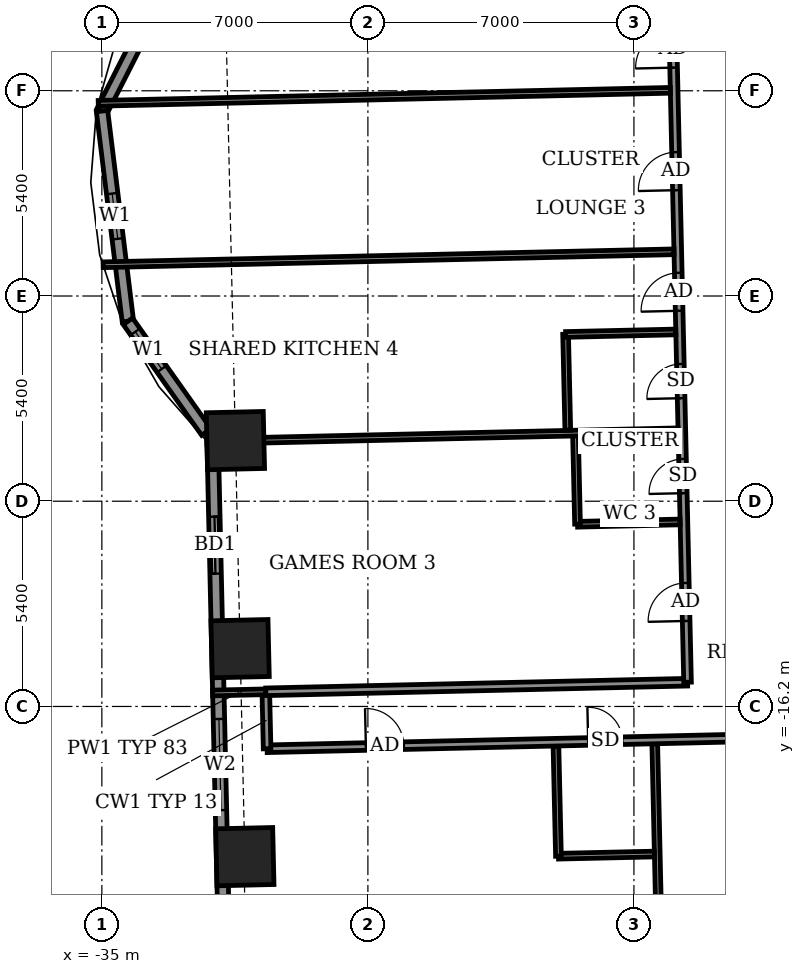
"""IFC4 building model, lengths in metres.
Left out: names, types, materials, properties, quantities, classifications, styles, units other than length and angle.
Written with IfcOpenShell. Run it as: python <this file> out.ifc"""

import sys

from ifc_helpers import new_model, si_unit, direction, frame, frame_2d, origin, origin_2d, place, context, subcontext, project, spatial, rectangle, extrude, element, fill, save


model = new_model("IFC4")
c1 = context("Model", 3, precision=1e-05, world=origin(), true_north=direction((0.0, 1.0)))
c2 = subcontext(c1, "Body", "Model", "MODEL_VIEW")
j1 = project(units=[si_unit("LENGTHUNIT", "METRE"), si_unit("PLANEANGLEUNIT", "RADIAN")], contexts=[c1])
p1 = place(None, origin())
s1 = spatial("IfcSite", under=j1, at=p1, CompositionType="ELEMENT")
p2 = place(p1, origin())
s2 = spatial("IfcBuilding", under=s1, at=p2, CompositionType="ELEMENT")
p3 = place(p2, frame((0.0, 0.0, 44.9)))
s3 = spatial("IfcBuildingStorey", under=s2, at=p3, CompositionType="ELEMENT", Elevation=44.9)
for number, where, z_axis, x_axis in (
    (1, (-31.486, -9.205, -0.55), (0.0, 0.0, 1.0), (0.023, -1.0, 0.0)),
    (2, (-31.362, -14.679, -0.55), (0.0, 0.0, 1.0), (0.023, -1.0, 0.0)),
    (3, (-31.238, -20.152, -0.55), (0.0, 0.0, 1.0), (0.023, -1.0, 0.0)),
):
    element("IfcColumn", number, at=place(p3, frame(where, z_axis=z_axis, x_axis=x_axis)), inside=s3, PredefinedType="COLUMN", context=c2, shape_type="SweptSolid", body=[
        extrude(rectangle(XDim=1.5, YDim=1.5, at=origin_2d()), origin(), (0.0, 0.0, 1.0), 3.6),
    ])
p4 = place(p3, frame((-32.552, 4.28, 0.0), z_axis=(0.0, 0.0, 1.0), x_axis=(-0.452703975507, -0.891660871946, 0.0)))
e4 = element("IfcWall", 4, at=p4, inside=s3, PredefinedType="SOLIDWALL", context=c2, shape_type="SweptSolid", body=[
    extrude(rectangle(XDim=5.399, YDim=0.3, at=frame_2d((2.699, 0.0))), origin(), (0.0, 0.0, 1.0), 3.05),
])
p5 = place(p4, frame((2.007, 0.0, 0.9)))
e5 = element("IfcOpeningElement", 5, at=p5, cuts=e4, PredefinedType="OPENING", context=c2, shape_type="SweptSolid", body=[
    extrude(rectangle(XDim=1.2, YDim=1.5, at=frame_2d((0.6, 0.75))), frame((0.0, 0.16, 0.0), z_axis=(0.0, -1.0, 0.0), x_axis=(1.0, 0.0, 0.0)), (0.0, 0.0, 1.0), 0.32),
])
p6 = place(p3, frame((-34.996, -0.534, 0.0), z_axis=(0.0, 0.0, 1.0), x_axis=(0.122206978992, -0.992504636909, 0.0)))
e6 = element("IfcWall", 6, at=p6, inside=s3, PredefinedType="SOLIDWALL", context=c2, shape_type="SweptSolid", body=[
    extrude(rectangle(XDim=5.574, YDim=0.3, at=frame_2d((2.787, 0.0))), origin(), (0.0, 0.0, 1.0), 3.05),
])
p7 = place(p6, frame((2.187, 0.0, 0.9)))
e7 = element("IfcOpeningElement", 7, at=p7, cuts=e6, PredefinedType="OPENING", context=c2, shape_type="SweptSolid", body=[
    extrude(rectangle(XDim=1.2, YDim=1.5, at=frame_2d((0.6, 0.75))), frame((0.0, 0.16, 0.0), z_axis=(0.0, -1.0, 0.0), x_axis=(1.0, 0.0, 0.0)), (0.0, 0.0, 1.0), 0.32),
])
p8 = place(p3, frame((-34.315, -6.066, 0.0), z_axis=(0.0, 0.0, 1.0), x_axis=(0.578062893695, -0.815992212544, 0.0)))
e8 = element("IfcWall", 8, at=p8, inside=s3, PredefinedType="SOLIDWALL", context=c2, shape_type="SweptSolid", body=[
    extrude(rectangle(XDim=3.569, YDim=0.3, at=frame_2d((1.784, 0.0))), origin(), (0.0, 0.0, 1.0), 3.05),
])
p9 = place(p8, frame((0.338, 0.0, 0.9)))
e9 = element("IfcOpeningElement", 9, at=p9, cuts=e8, PredefinedType="OPENING", context=c2, shape_type="SweptSolid", body=[
    extrude(rectangle(XDim=1.2, YDim=1.5, at=frame_2d((0.6, 0.75))), frame((0.0, 0.16, 0.0), z_axis=(0.0, -1.0, 0.0), x_axis=(1.0, 0.0, 0.0)), (0.0, 0.0, 1.0), 0.32),
])
p10 = place(p3, frame((-32.087, -9.164, 0.0), z_axis=(0.0, 0.0, 1.0), x_axis=(0.022651102902, -0.999743430855, 0.0)))
e10 = element("IfcWall", 10, at=p10, inside=s3, PredefinedType="SOLIDWALL", context=c2, shape_type="SweptSolid", body=[
    extrude(rectangle(XDim=16.329, YDim=0.3, at=frame_2d((8.165, 0.0))), origin(), (0.0, 0.0, 1.0), 3.05),
])
p11 = place(p10, frame((2.042, 0.0, 0.0)))
e11 = element("IfcOpeningElement", 11, at=p11, cuts=e10, PredefinedType="OPENING", context=c2, shape_type="SweptSolid", body=[
    extrude(rectangle(XDim=1.5, YDim=2.4, at=frame_2d((0.75, 1.2))), frame((0.0, 0.16, 0.0), z_axis=(0.0, -1.0, 0.0), x_axis=(1.0, 0.0, 0.0)), (0.0, 0.0, 1.0), 0.32),
])
p12 = place(p10, frame((7.367, 0.0, 0.9)))
e12 = element("IfcOpeningElement", 12, at=p12, cuts=e10, PredefinedType="OPENING", context=c2, shape_type="SweptSolid", body=[
    extrude(rectangle(XDim=2.4, YDim=1.5, at=frame_2d((1.2, 0.75))), frame((0.0, 0.16, 0.0), z_axis=(0.0, -1.0, 0.0), x_axis=(1.0, 0.0, 0.0)), (0.0, 0.0, 1.0), 0.32),
])
p13 = place(p3, frame((-33.464, -12.375, 0.0), z_axis=(0.0, 0.0, 1.0), x_axis=(-0.022929749512, 0.99973707873, 0.0)))
e13 = element("IfcWall", 13, at=p13, inside=s3, PredefinedType="USERDEFINED", context=c2, shape_type="SweptSolid", body=[
    extrude(rectangle(XDim=2.875, YDim=0.55, at=frame_2d((1.438, 0.0))), origin(), (0.0, 0.0, 1.0), 0.8),
])
p14 = place(p3, frame((-20.171, -29.579, 0.0), z_axis=(0.0, 0.0, 1.0), x_axis=(-0.022661029756, 0.999743205894, 0.0)))
e14 = element("IfcWall", 14, at=p14, inside=s3, PredefinedType="PARTITIONING", context=c2, shape_type="SweptSolid", body=[
    extrude(rectangle(XDim=12.4, YDim=0.15, at=frame_2d((6.2, 0.0))), origin(), (0.0, 0.0, 1.0), 3.05),
])
p15 = place(p3, frame((-22.986, -20.14, 0.0), z_axis=(0.0, 0.0, 1.0), x_axis=(0.999746160391, 0.022530308093, 0.0)))
e15 = element("IfcWall", 15, at=p15, inside=s3, PredefinedType="PARTITIONING", context=c2, shape_type="SweptSolid", body=[
    extrude(rectangle(XDim=2.525, YDim=0.15, at=frame_2d((1.262, 0.0))), origin(), (0.0, 0.0, 1.0), 3.05),
])
p16 = place(p3, frame((-22.986, -20.14, 0.0), z_axis=(0.0, 0.0, 1.0), x_axis=(-0.022732880677, 0.999741574676, 0.0)))
e16 = element("IfcWall", 16, at=p16, inside=s3, PredefinedType="PARTITIONING", context=c2, shape_type="SweptSolid", body=[
    extrude(rectangle(XDim=2.9, YDim=0.15, at=frame_2d((1.45, 0.0))), origin(), (0.0, 0.0, 1.0), 3.05),
])
p17 = place(p3, frame((-30.652, -17.313, 0.0), z_axis=(0.0, 0.0, 1.0), x_axis=(0.999742623764, 0.02268669719, 0.0)))
e17 = element("IfcWall", 17, at=p17, inside=s3, PredefinedType="PARTITIONING", context=c2, shape_type="SweptSolid", body=[
    extrude(rectangle(XDim=58.8, YDim=0.2, at=frame_2d((29.4, 0.0))), origin(), (0.0, 0.0, 1.0), 3.05),
])
p18 = place(p17, frame((2.6, 0.0, 0.0)))
e18 = element("IfcOpeningElement", 18, at=p18, cuts=e17, PredefinedType="OPENING", context=c2, shape_type="SweptSolid", body=[
    extrude(rectangle(XDim=1.0, YDim=2.1, at=frame_2d((0.5, 1.05))), frame((0.0, 0.11, 0.0), z_axis=(0.0, -1.0, 0.0), x_axis=(1.0, 0.0, 0.0)), (0.0, 0.0, 1.0), 0.22),
])
p19 = place(p17, frame((8.45, 0.0, 0.0)))
e19 = element("IfcOpeningElement", 19, at=p19, cuts=e17, PredefinedType="OPENING", context=c2, shape_type="SweptSolid", body=[
    extrude(rectangle(XDim=0.9, YDim=2.1, at=frame_2d((0.45, 1.05))), frame((0.0, 0.11, 0.0), z_axis=(0.0, -1.0, 0.0), x_axis=(1.0, 0.0, 0.0)), (0.0, 0.0, 1.0), 0.22),
])
p20 = place(p17, frame((13.325, 0.0, 0.0)))
e20 = element("IfcOpeningElement", 20, at=p20, cuts=e17, PredefinedType="OPENING", context=c2, shape_type="SweptSolid", body=[
    extrude(rectangle(XDim=0.9, YDim=2.1, at=frame_2d((0.45, 1.05))), frame((0.0, 0.11, 0.0), z_axis=(0.0, -1.0, 0.0), x_axis=(1.0, 0.0, 0.0)), (0.0, 0.0, 1.0), 0.22),
])
p21 = place(p17, frame((15.7, 0.0, 0.0)))
e21 = element("IfcOpeningElement", 21, at=p21, cuts=e17, PredefinedType="OPENING", context=c2, shape_type="SweptSolid", body=[
    extrude(rectangle(XDim=0.9, YDim=2.1, at=frame_2d((0.45, 1.05))), frame((0.0, 0.11, 0.0), z_axis=(0.0, -1.0, 0.0), x_axis=(1.0, 0.0, 0.0)), (0.0, 0.0, 1.0), 0.22),
])
p22 = place(p17, frame((22.725, 0.0, 0.0)))
e22 = element("IfcOpeningElement", 22, at=p22, cuts=e17, PredefinedType="OPENING", context=c2, shape_type="SweptSolid", body=[
    extrude(rectangle(XDim=0.9, YDim=2.1, at=frame_2d((0.45, 1.05))), frame((0.0, 0.11, 0.0), z_axis=(0.0, -1.0, 0.0), x_axis=(1.0, 0.0, 0.0)), (0.0, 0.0, 1.0), 0.22),
])
p23 = place(p17, frame((24.875, 0.0, 0.0)))
e23 = element("IfcOpeningElement", 23, at=p23, cuts=e17, PredefinedType="OPENING", context=c2, shape_type="SweptSolid", body=[
    extrude(rectangle(XDim=0.9, YDim=2.1, at=frame_2d((0.45, 1.05))), frame((0.0, 0.11, 0.0), z_axis=(0.0, -1.0, 0.0), x_axis=(1.0, 0.0, 0.0)), (0.0, 0.0, 1.0), 0.22),
])
p24 = place(p17, frame((31.825, 0.0, 0.0)))
e24 = element("IfcOpeningElement", 24, at=p24, cuts=e17, PredefinedType="OPENING", context=c2, shape_type="SweptSolid", body=[
    extrude(rectangle(XDim=0.9, YDim=2.1, at=frame_2d((0.45, 1.05))), frame((0.0, 0.11, 0.0), z_axis=(0.0, -1.0, 0.0), x_axis=(1.0, 0.0, 0.0)), (0.0, 0.0, 1.0), 0.22),
])
p25 = place(p17, frame((34.025, 0.0, 0.0)))
e25 = element("IfcOpeningElement", 25, at=p25, cuts=e17, PredefinedType="OPENING", context=c2, shape_type="SweptSolid", body=[
    extrude(rectangle(XDim=0.9, YDim=2.1, at=frame_2d((0.45, 1.05))), frame((0.0, 0.11, 0.0), z_axis=(0.0, -1.0, 0.0), x_axis=(1.0, 0.0, 0.0)), (0.0, 0.0, 1.0), 0.22),
])
p26 = place(p17, frame((41.325, 0.0, 0.0)))
e26 = element("IfcOpeningElement", 26, at=p26, cuts=e17, PredefinedType="OPENING", context=c2, shape_type="SweptSolid", body=[
    extrude(rectangle(XDim=0.9, YDim=2.1, at=frame_2d((0.45, 1.05))), frame((0.0, 0.11, 0.0), z_axis=(0.0, -1.0, 0.0), x_axis=(1.0, 0.0, 0.0)), (0.0, 0.0, 1.0), 0.22),
])
p27 = place(p17, frame((43.7, 0.0, 0.0)))
e27 = element("IfcOpeningElement", 27, at=p27, cuts=e17, PredefinedType="OPENING", context=c2, shape_type="SweptSolid", body=[
    extrude(rectangle(XDim=0.9, YDim=2.1, at=frame_2d((0.45, 1.05))), frame((0.0, 0.11, 0.0), z_axis=(0.0, -1.0, 0.0), x_axis=(1.0, 0.0, 0.0)), (0.0, 0.0, 1.0), 0.22),
])
p28 = place(p17, frame((50.65, 0.0, 0.0)))
e28 = element("IfcOpeningElement", 28, at=p28, cuts=e17, PredefinedType="OPENING", context=c2, shape_type="SweptSolid", body=[
    extrude(rectangle(XDim=0.9, YDim=2.1, at=frame_2d((0.45, 1.05))), frame((0.0, 0.11, 0.0), z_axis=(0.0, -1.0, 0.0), x_axis=(1.0, 0.0, 0.0)), (0.0, 0.0, 1.0), 0.22),
])
p29 = place(p17, frame((55.304, 0.0, 0.0)))
e29 = element("IfcOpeningElement", 29, at=p29, cuts=e17, PredefinedType="OPENING", context=c2, shape_type="SweptSolid", body=[
    extrude(rectangle(XDim=1.0, YDim=2.1, at=frame_2d((0.5, 1.05))), frame((0.0, 0.11, 0.0), z_axis=(0.0, -1.0, 0.0), x_axis=(1.0, 0.0, 0.0)), (0.0, 0.0, 1.0), 0.22),
])
p30 = place(p3, frame((-30.652, -17.313, 0.0), z_axis=(0.0, 0.0, 1.0), x_axis=(-0.022632637625, 0.99974384905, 0.0)))
e30 = element("IfcWall", 30, at=p30, inside=s3, PredefinedType="PARTITIONING", context=c2, shape_type="SweptSolid", body=[
    extrude(rectangle(XDim=1.5, YDim=0.2, at=frame_2d((0.75, 0.0))), origin(), (0.0, 0.0, 1.0), 3.05),
])
p31 = place(p3, frame((-32.086, -15.845, 0.0), z_axis=(0.0, 0.0, 1.0), x_axis=(0.999754810245, 0.022143156767, 0.0)))
e31 = element("IfcWall", 31, at=p31, inside=s3, PredefinedType="PARTITIONING", context=c2, shape_type="SweptSolid", body=[
    extrude(rectangle(XDim=1.4, YDim=0.15, at=frame_2d((0.7, 0.0))), origin(), (0.0, 0.0, 1.0), 2.55),
])
p32 = place(p3, frame((-30.686, -15.814, 0.0), z_axis=(0.0, 0.0, 1.0), x_axis=(0.999742346277, 0.022698921993, 0.0)))
e32 = element("IfcWall", 32, at=p32, inside=s3, PredefinedType="PARTITIONING", context=c2, shape_type="SweptSolid", body=[
    extrude(rectangle(XDim=11.1, YDim=0.2, at=frame_2d((5.55, 0.0))), origin(), (0.0, 0.0, 1.0), 3.05),
])
p33 = place(p3, frame((-19.589, -15.562, 0.0), z_axis=(0.0, 0.0, 1.0), x_axis=(-0.02267447203, 0.999742901109, 0.0)))
e33 = element("IfcWall", 33, at=p33, inside=s3, PredefinedType="PARTITIONING", context=c2, shape_type="SweptSolid", body=[
    extrude(rectangle(XDim=27.65, YDim=0.2, at=frame_2d((13.825, 0.0))), origin(), (0.0, 0.0, 1.0), 3.05),
])
p34 = place(p33, frame((20.8, 0.0, 0.0)))
e34 = element("IfcOpeningElement", 34, at=p34, cuts=e33, PredefinedType="OPENING", context=c2, shape_type="SweptSolid", body=[
    extrude(rectangle(XDim=1.0, YDim=2.1, at=frame_2d((0.5, 1.05))), frame((0.0, 0.11, 0.0), z_axis=(0.0, -1.0, 0.0), x_axis=(1.0, 0.0, 0.0)), (0.0, 0.0, 1.0), 0.22),
])
p35 = place(p33, frame((22.975, 0.0, 0.0)))
e35 = element("IfcOpeningElement", 35, at=p35, cuts=e33, PredefinedType="OPENING", context=c2, shape_type="SweptSolid", body=[
    extrude(rectangle(XDim=0.9, YDim=2.1, at=frame_2d((0.45, 1.05))), frame((0.0, 0.11, 0.0), z_axis=(0.0, -1.0, 0.0), x_axis=(1.0, 0.0, 0.0)), (0.0, 0.0, 1.0), 0.22),
])
p36 = place(p33, frame((16.175, 0.0, 0.0)))
e36 = element("IfcOpeningElement", 36, at=p36, cuts=e33, PredefinedType="OPENING", context=c2, shape_type="SweptSolid", body=[
    extrude(rectangle(XDim=1.0, YDim=2.1, at=frame_2d((0.5, 1.05))), frame((0.0, 0.11, 0.0), z_axis=(0.0, -1.0, 0.0), x_axis=(1.0, 0.0, 0.0)), (0.0, 0.0, 1.0), 0.22),
])
p37 = place(p33, frame((18.625, 0.0, 0.0)))
e37 = element("IfcOpeningElement", 37, at=p37, cuts=e33, PredefinedType="OPENING", context=c2, shape_type="SweptSolid", body=[
    extrude(rectangle(XDim=0.9, YDim=2.1, at=frame_2d((0.45, 1.05))), frame((0.0, 0.11, 0.0), z_axis=(0.0, -1.0, 0.0), x_axis=(1.0, 0.0, 0.0)), (0.0, 0.0, 1.0), 0.22),
])
p38 = place(p33, frame((12.95, 0.0, 0.0)))
e38 = element("IfcOpeningElement", 38, at=p38, cuts=e33, PredefinedType="OPENING", context=c2, shape_type="SweptSolid", body=[
    extrude(rectangle(XDim=1.0, YDim=2.1, at=frame_2d((0.5, 1.05))), frame((0.0, 0.11, 0.0), z_axis=(0.0, -1.0, 0.0), x_axis=(1.0, 0.0, 0.0)), (0.0, 0.0, 1.0), 0.22),
])
p39 = place(p33, frame((9.775, 0.0, 0.0)))
e39 = element("IfcOpeningElement", 39, at=p39, cuts=e33, PredefinedType="OPENING", context=c2, shape_type="SweptSolid", body=[
    extrude(rectangle(XDim=1.0, YDim=2.1, at=frame_2d((0.5, 1.05))), frame((0.0, 0.11, 0.0), z_axis=(0.0, -1.0, 0.0), x_axis=(1.0, 0.0, 0.0)), (0.0, 0.0, 1.0), 0.22),
])
p40 = place(p33, frame((7.475, 0.0, 0.0)))
e40 = element("IfcOpeningElement", 40, at=p40, cuts=e33, PredefinedType="OPENING", context=c2, shape_type="SweptSolid", body=[
    extrude(rectangle(XDim=0.9, YDim=2.1, at=frame_2d((0.45, 1.05))), frame((0.0, 0.11, 0.0), z_axis=(0.0, -1.0, 0.0), x_axis=(1.0, 0.0, 0.0)), (0.0, 0.0, 1.0), 0.22),
])
p41 = place(p33, frame((1.612, 0.0, 0.0)))
e41 = element("IfcOpeningElement", 41, at=p41, cuts=e33, PredefinedType="OPENING", context=c2, shape_type="SweptSolid", body=[
    extrude(rectangle(XDim=1.0, YDim=2.1, at=frame_2d((0.5, 1.05))), frame((0.0, 0.11, 0.0), z_axis=(0.0, -1.0, 0.0), x_axis=(1.0, 0.0, 0.0)), (0.0, 0.0, 1.0), 0.22),
])
p42 = place(p33, frame((4.975, 0.0, 0.0)))
e42 = element("IfcOpeningElement", 42, at=p42, cuts=e33, PredefinedType="OPENING", context=c2, shape_type="SweptSolid", body=[
    extrude(rectangle(XDim=0.9, YDim=2.1, at=frame_2d((0.45, 1.05))), frame((0.0, 0.11, 0.0), z_axis=(0.0, -1.0, 0.0), x_axis=(1.0, 0.0, 0.0)), (0.0, 0.0, 1.0), 0.22),
])
p43 = place(p3, frame((-22.484, -11.406, 0.0), z_axis=(0.0, 0.0, 1.0), x_axis=(0.999744396973, 0.02260842146, 0.0)))
e43 = element("IfcWall", 43, at=p43, inside=s3, PredefinedType="PARTITIONING", context=c2, shape_type="SweptSolid", body=[
    extrude(rectangle(XDim=2.7, YDim=0.15, at=frame_2d((1.35, 0.0))), origin(), (0.0, 0.0, 1.0), 3.05),
])
p44 = place(p3, frame((-22.484, -11.401, 0.0), z_axis=(0.0, 0.0, 1.0), x_axis=(-0.022895561926, 0.999737862264, 0.0)))
e44 = element("IfcWall", 44, at=p44, inside=s3, PredefinedType="PARTITIONING", context=c2, shape_type="SweptSolid", body=[
    extrude(rectangle(XDim=2.324, YDim=0.15, at=frame_2d((1.162, 0.0))), origin(), (0.0, 0.0, 1.0), 3.05),
])
p45 = place(p3, frame((-32.236, -9.227, 0.0), z_axis=(0.0, 0.0, 1.0), x_axis=(0.999743195783, 0.022661475803, 0.0)))
e45 = element("IfcWall", 45, at=p45, inside=s3, PredefinedType="PARTITIONING", context=c2, shape_type="SweptSolid", body=[
    extrude(rectangle(XDim=12.4, YDim=0.15, at=frame_2d((6.2, 0.0))), origin(), (0.0, 0.0, 1.0), 3.05),
])
p46 = place(p3, frame((-22.74, -8.931, 0.0), z_axis=(0.0, 0.0, 1.0), x_axis=(-0.023015762656, 0.999735102249, 0.0)))
e46 = element("IfcWall", 46, at=p46, inside=s3, PredefinedType="PARTITIONING", context=c2, shape_type="SweptSolid", body=[
    extrude(rectangle(XDim=2.525, YDim=0.15, at=frame_2d((1.262, 0.0))), origin(), (0.0, 0.0, 1.0), 3.05),
])
p47 = place(p3, frame((-22.797, -6.412, 0.0), z_axis=(0.0, 0.0, 1.0), x_axis=(0.999739701447, 0.022815112345, 0.0)))
e47 = element("IfcWall", 47, at=p47, inside=s3, PredefinedType="PARTITIONING", context=c2, shape_type="SweptSolid", body=[
    extrude(rectangle(XDim=2.9, YDim=0.15, at=frame_2d((1.45, 0.0))), origin(), (0.0, 0.0, 1.0), 3.05),
])
p48 = place(p3, frame((-34.967, -4.578, 0.0), z_axis=(0.0, 0.0, 1.0), x_axis=(0.999742690494, 0.022683756395, 0.0)))
e48 = element("IfcWall", 48, at=p48, inside=s3, PredefinedType="PARTITIONING", context=c2, shape_type="SweptSolid", body=[
    extrude(rectangle(XDim=15.025, YDim=0.15, at=frame_2d((7.512, 0.0))), origin(), (0.0, 0.0, 1.0), 2.05),
])
p49 = place(p3, frame((-35.095, -0.33, 0.0), z_axis=(0.0, 0.0, 1.0), x_axis=(0.999741944356, 0.022716617157, 0.0)))
e49 = element("IfcWall", 49, at=p49, inside=s3, PredefinedType="PARTITIONING", context=c2, shape_type="SweptSolid", body=[
    extrude(rectangle(XDim=15.057, YDim=0.15, at=frame_2d((7.528, 0.0))), origin(), (0.0, 0.0, 1.0), 2.05),
])
p50 = place(p7, origin())
e50 = element("IfcWindow", 50, at=p50, inside=s3, PartitioningType="SINGLE_PANEL", PredefinedType="WINDOW", context=c2, shape_type="SweptSolid", body=[
    extrude(rectangle(XDim=1.2, YDim=1.5, at=frame_2d((0.6, 0.75))), frame((0.0, 0.03, 0.0), z_axis=(0.0, -1.0, 0.0), x_axis=(1.0, 0.0, 0.0)), (0.0, 0.0, 1.0), 0.06),
])
fill(e7, e50)
p51 = place(p9, origin())
e51 = element("IfcWindow", 51, at=p51, inside=s3, PartitioningType="SINGLE_PANEL", PredefinedType="WINDOW", context=c2, shape_type="SweptSolid", body=[
    extrude(rectangle(XDim=1.2, YDim=1.5, at=frame_2d((0.6, 0.75))), frame((0.0, 0.03, 0.0), z_axis=(0.0, -1.0, 0.0), x_axis=(1.0, 0.0, 0.0)), (0.0, 0.0, 1.0), 0.06),
])
fill(e9, e51)
p52 = place(p11, origin())
e52 = element("IfcDoor", 52, at=p52, inside=s3, OperationType="SLIDING_TO_LEFT", PredefinedType="DOOR", context=c2, shape_type="SweptSolid", body=[
    extrude(rectangle(XDim=1.5, YDim=2.4, at=frame_2d((0.75, 1.2))), frame((0.0, 0.025, 0.0), z_axis=(0.0, -1.0, 0.0), x_axis=(1.0, 0.0, 0.0)), (0.0, 0.0, 1.0), 0.05),
])
fill(e11, e52)
p53 = place(p12, origin())
e53 = element("IfcWindow", 53, at=p53, inside=s3, PartitioningType="DOUBLE_PANEL_VERTICAL", PredefinedType="WINDOW", context=c2, shape_type="SweptSolid", body=[
    extrude(rectangle(XDim=2.4, YDim=1.5, at=frame_2d((1.2, 0.75))), frame((0.0, 0.03, 0.0), z_axis=(0.0, -1.0, 0.0), x_axis=(1.0, 0.0, 0.0)), (0.0, 0.0, 1.0), 0.06),
])
fill(e12, e53)
p54 = place(p18, origin())
e54 = element("IfcDoor", 54, at=p54, inside=s3, OperationType="SINGLE_SWING_LEFT", PredefinedType="DOOR", context=c2, shape_type="SweptSolid", body=[
    extrude(rectangle(XDim=1.0, YDim=2.1, at=frame_2d((0.5, 1.05))), frame((0.0, 0.025, 0.0), z_axis=(0.0, -1.0, 0.0), x_axis=(1.0, 0.0, 0.0)), (0.0, 0.0, 1.0), 0.05),
])
fill(e18, e54)
p55 = place(p19, origin())
e55 = element("IfcDoor", 55, at=p55, inside=s3, OperationType="SINGLE_SWING_LEFT", PredefinedType="DOOR", context=c2, shape_type="SweptSolid", body=[
    extrude(rectangle(XDim=0.9, YDim=2.1, at=frame_2d((0.45, 1.05))), frame((0.0, 0.025, 0.0), z_axis=(0.0, -1.0, 0.0), x_axis=(1.0, 0.0, 0.0)), (0.0, 0.0, 1.0), 0.05),
])
fill(e19, e55)
p56 = place(p36, origin())
e56 = element("IfcDoor", 56, at=p56, inside=s3, OperationType="SINGLE_SWING_RIGHT", PredefinedType="DOOR", context=c2, shape_type="SweptSolid", body=[
    extrude(rectangle(XDim=1.0, YDim=2.1, at=frame_2d((0.5, 1.05))), frame((0.0, 0.025, 0.0), z_axis=(0.0, -1.0, 0.0), x_axis=(1.0, 0.0, 0.0)), (0.0, 0.0, 1.0), 0.05),
])
fill(e36, e56)
p57 = place(p38, origin())
e57 = element("IfcDoor", 57, at=p57, inside=s3, OperationType="SINGLE_SWING_LEFT", PredefinedType="DOOR", context=c2, shape_type="SweptSolid", body=[
    extrude(rectangle(XDim=1.0, YDim=2.1, at=frame_2d((0.5, 1.05))), frame((0.0, 0.025, 0.0), z_axis=(0.0, -1.0, 0.0), x_axis=(1.0, 0.0, 0.0)), (0.0, 0.0, 1.0), 0.05),
])
fill(e38, e57)
p58 = place(p39, origin())
e58 = element("IfcDoor", 58, at=p58, inside=s3, OperationType="SINGLE_SWING_RIGHT", PredefinedType="DOOR", context=c2, shape_type="SweptSolid", body=[
    extrude(rectangle(XDim=1.0, YDim=2.1, at=frame_2d((0.5, 1.05))), frame((0.0, 0.025, 0.0), z_axis=(0.0, -1.0, 0.0), x_axis=(1.0, 0.0, 0.0)), (0.0, 0.0, 1.0), 0.05),
])
fill(e39, e58)
p59 = place(p40, origin())
e59 = element("IfcDoor", 59, at=p59, inside=s3, OperationType="SINGLE_SWING_RIGHT", PredefinedType="DOOR", context=c2, shape_type="SweptSolid", body=[
    extrude(rectangle(XDim=0.9, YDim=2.1, at=frame_2d((0.45, 1.05))), frame((0.0, 0.025, 0.0), z_axis=(0.0, -1.0, 0.0), x_axis=(1.0, 0.0, 0.0)), (0.0, 0.0, 1.0), 0.05),
])
fill(e40, e59)
p60 = place(p41, origin())
e60 = element("IfcDoor", 60, at=p60, inside=s3, OperationType="SINGLE_SWING_LEFT", PredefinedType="DOOR", context=c2, shape_type="SweptSolid", body=[
    extrude(rectangle(XDim=1.0, YDim=2.1, at=frame_2d((0.5, 1.05))), frame((0.0, 0.025, 0.0), z_axis=(0.0, -1.0, 0.0), x_axis=(1.0, 0.0, 0.0)), (0.0, 0.0, 1.0), 0.05),
])
fill(e41, e60)
p61 = place(p42, origin())
e61 = element("IfcDoor", 61, at=p61, inside=s3, OperationType="SINGLE_SWING_LEFT", PredefinedType="DOOR", context=c2, shape_type="SweptSolid", body=[
    extrude(rectangle(XDim=0.9, YDim=2.1, at=frame_2d((0.45, 1.05))), frame((0.0, 0.025, 0.0), z_axis=(0.0, -1.0, 0.0), x_axis=(1.0, 0.0, 0.0)), (0.0, 0.0, 1.0), 0.05),
])
fill(e42, e61)
save(model, sys.argv[1])
